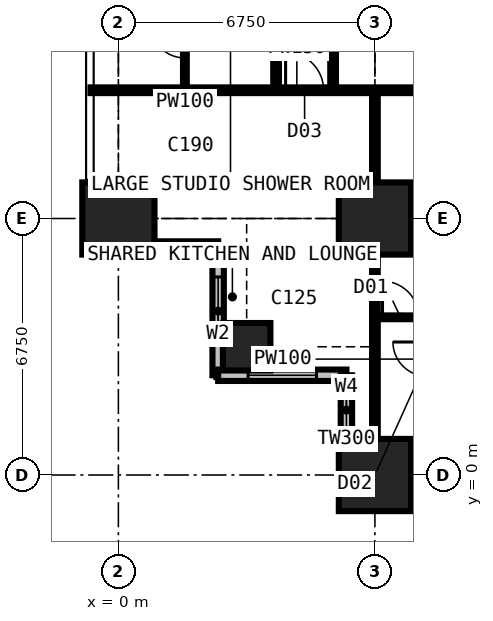
"""IFC4 building model, lengths in metres.
Left out: names, types, materials, properties, quantities, classifications, styles, units other than length and angle.
Written with IfcOpenShell. Run it as: python <this file> out.ifc"""

import sys

from ifc_helpers import new_model, si_unit, direction, frame, frame_2d, origin, origin_2d, place, context, subcontext, project, spatial, rectangle, extrude, element, fill, save


model = new_model("IFC4")
c1 = context("Model", 3, precision=1e-05, world=origin(), true_north=direction((0.0, 1.0)))
c2 = subcontext(c1, "Body", "Model", "MODEL_VIEW")
j1 = project(units=[si_unit("LENGTHUNIT", "METRE"), si_unit("PLANEANGLEUNIT", "RADIAN")], contexts=[c1])
p1 = place(None, origin())
s1 = spatial("IfcSite", under=j1, at=p1, CompositionType="ELEMENT")
p2 = place(p1, origin())
s2 = spatial("IfcBuilding", under=s1, at=p2, CompositionType="ELEMENT")
p3 = place(p2, frame((0.0, 0.0, 43.2)))
s3 = spatial("IfcBuildingStorey", under=s2, at=p3, CompositionType="ELEMENT", Elevation=43.2)
p4 = place(p3, frame((0.0, 6.75, 0.0), z_axis=(0.0, 0.0, 1.0), x_axis=(1.0, 0.0, 0.0)))
e1 = element("IfcColumn", 1, at=p4, inside=s3, PredefinedType="COLUMN", context=c2, shape_type="SweptSolid", body=[
    extrude(rectangle(XDim=1.9, YDim=1.9, at=origin_2d()), origin(), (0.0, 0.0, 1.0), 3.6),
])
p5 = place(p3, frame((3.375, 3.375, 0.0), z_axis=(0.0, 0.0, 1.0), x_axis=(1.0, 0.0, 0.0)))
e2 = element("IfcColumn", 2, at=p5, inside=s3, PredefinedType="COLUMN", context=c2, shape_type="SweptSolid", body=[
    extrude(rectangle(XDim=1.25, YDim=1.25, at=origin_2d()), origin(), (0.0, 0.0, 1.0), 3.6),
])
for number, where, z_axis, x_axis in (
    (3, (6.75, 0.0, 0.0), (0.0, 0.0, 1.0), (1.0, 0.0, 0.0)),
    (4, (6.75, 6.75, 0.0), (0.0, 0.0, 1.0), (1.0, 0.0, 0.0)),
):
    element("IfcColumn", number, at=place(p3, frame(where, z_axis=z_axis, x_axis=x_axis)), inside=s3, PredefinedType="COLUMN", context=c2, shape_type="SweptSolid", body=[
        extrude(rectangle(XDim=1.9, YDim=1.9, at=origin_2d()), origin(), (0.0, 0.0, 1.0), 3.6),
    ])
p6 = place(p3, frame((-0.75, 6.0, 0.0), z_axis=(0.0, 0.0, 1.0), x_axis=(1.0, 0.0, 0.0)))
e5 = element("IfcWall", 5, at=p6, inside=s3, PredefinedType="SOLIDWALL", context=c2, shape_type="SweptSolid", body=[
    extrude(rectangle(XDim=3.375, YDim=0.3, at=frame_2d((1.688, 0.0))), origin(), (0.0, 0.0, 1.0), 3.375),
])
p7 = place(p6, frame((1.857, 0.0, 0.9)))
e6 = element("IfcOpeningElement", 6, at=p7, cuts=e5, PredefinedType="OPENING", context=c2, shape_type="SweptSolid", body=[
    extrude(rectangle(XDim=1.2, YDim=1.8, at=frame_2d((0.6, 0.9))), frame((0.0, 0.16, 0.0), z_axis=(0.0, -1.0, 0.0), x_axis=(1.0, 0.0, 0.0)), (0.0, 0.0, 1.0), 0.32),
])
p8 = place(p3, frame((2.625, 6.0, 0.0), z_axis=(0.0, 0.0, 1.0), x_axis=(0.0, -1.0, 0.0)))
e7 = element("IfcWall", 7, at=p8, inside=s3, PredefinedType="SOLIDWALL", context=c2, shape_type="SweptSolid", body=[
    extrude(rectangle(XDim=3.375, YDim=0.3, at=frame_2d((1.688, 0.0))), origin(), (0.0, 0.0, 1.0), 3.375),
])
p9 = place(p8, frame((0.788, 0.0, 0.6)))
e8 = element("IfcOpeningElement", 8, at=p9, cuts=e7, PredefinedType="OPENING", context=c2, shape_type="SweptSolid", body=[
    extrude(rectangle(XDim=1.8, YDim=2.1, at=frame_2d((0.9, 1.05))), frame((0.0, 0.16, 0.0), z_axis=(0.0, -1.0, 0.0), x_axis=(1.0, 0.0, 0.0)), (0.0, 0.0, 1.0), 0.32),
])
p10 = place(p3, frame((2.625, 2.625, 0.0), z_axis=(0.0, 0.0, 1.0), x_axis=(1.0, 0.0, 0.0)))
e9 = element("IfcWall", 9, at=p10, inside=s3, PredefinedType="SOLIDWALL", context=c2, shape_type="SweptSolid", body=[
    extrude(rectangle(XDim=3.375, YDim=0.3, at=frame_2d((1.688, 0.0))), origin(), (0.0, 0.0, 1.0), 3.375),
])
p11 = place(p10, frame((0.788, 0.0, 0.6)))
e10 = element("IfcOpeningElement", 10, at=p11, cuts=e9, PredefinedType="OPENING", context=c2, shape_type="SweptSolid", body=[
    extrude(rectangle(XDim=1.8, YDim=2.1, at=frame_2d((0.9, 1.05))), frame((0.0, 0.16, 0.0), z_axis=(0.0, -1.0, 0.0), x_axis=(1.0, 0.0, 0.0)), (0.0, 0.0, 1.0), 0.32),
])
p12 = place(p3, frame((6.0, 2.625, 0.0), z_axis=(0.0, 0.0, 1.0), x_axis=(0.0, -1.0, 0.0)))
e11 = element("IfcWall", 11, at=p12, inside=s3, PredefinedType="SOLIDWALL", context=c2, shape_type="SweptSolid", body=[
    extrude(rectangle(XDim=3.375, YDim=0.3, at=frame_2d((1.688, 0.0))), origin(), (0.0, 0.0, 1.0), 3.375),
])
p13 = place(p12, frame((0.317, 0.0, 0.9)))
e12 = element("IfcOpeningElement", 12, at=p13, cuts=e11, PredefinedType="OPENING", context=c2, shape_type="SweptSolid", body=[
    extrude(rectangle(XDim=1.2, YDim=1.8, at=frame_2d((0.6, 0.9))), frame((0.0, 0.16, 0.0), z_axis=(0.0, -1.0, 0.0), x_axis=(1.0, 0.0, 0.0)), (0.0, 0.0, 1.0), 0.32),
])
p14 = place(p3, frame((-0.734, 10.125, 0.0), z_axis=(0.0, 0.0, 1.0), x_axis=(1.0, 0.0, 0.0)))
e13 = element("IfcWall", 13, at=p14, inside=s3, PredefinedType="PARTITIONING", context=c2, shape_type="SweptSolid", body=[
    extrude(rectangle(XDim=10.859, YDim=0.15, at=frame_2d((5.429, 0.0))), origin(), (0.0, 0.0, 1.0), 3.375),
])
p15 = place(p14, frame((5.134, 0.0, 0.0)))
e14 = element("IfcOpeningElement", 14, at=p15, cuts=e13, PredefinedType="OPENING", context=c2, shape_type="SweptSolid", body=[
    extrude(rectangle(XDim=1.0, YDim=2.2, at=frame_2d((0.5, 1.1))), frame((0.0, 0.085, 0.0), z_axis=(0.0, -1.0, 0.0), x_axis=(1.0, 0.0, 0.0)), (0.0, 0.0, 1.0), 0.17),
])
p16 = place(p3, frame((1.75, 10.125, 0.0), z_axis=(0.0, 0.0, 1.0), x_axis=(0.0, 1.0, 0.0)))
e15 = element("IfcWall", 15, at=p16, inside=s3, PredefinedType="PARTITIONING", context=c2, shape_type="SweptSolid", body=[
    extrude(rectangle(XDim=2.6, YDim=0.1, at=frame_2d((1.3, 0.0))), origin(), (0.0, 0.0, 1.0), 3.375),
])
p17 = place(p16, frame((0.85, 0.0, 0.0)))
e16 = element("IfcOpeningElement", 16, at=p17, cuts=e15, PredefinedType="OPENING", context=c2, shape_type="SweptSolid", body=[
    extrude(rectangle(XDim=0.9, YDim=2.2, at=frame_2d((0.45, 1.1))), frame((0.0, 0.06, 0.0), z_axis=(0.0, -1.0, 0.0), x_axis=(1.0, 0.0, 0.0)), (0.0, 0.0, 1.0), 0.12),
])
p18 = place(p3, frame((4.15, 10.125, 0.0), z_axis=(0.0, 0.0, 1.0), x_axis=(0.0, 1.0, 0.0)))
e17 = element("IfcWall", 17, at=p18, inside=s3, PredefinedType="PARTITIONING", context=c2, shape_type="SweptSolid", body=[
    extrude(rectangle(XDim=23.625, YDim=0.15, at=frame_2d((11.812, 0.0))), origin(), (0.0, 0.0, 1.0), 3.375),
])
p19 = place(p18, frame((20.5, 0.0, 0.0)))
e18 = element("IfcOpeningElement", 18, at=p19, cuts=e17, PredefinedType="OPENING", context=c2, shape_type="SweptSolid", body=[
    extrude(rectangle(XDim=0.95, YDim=2.2, at=frame_2d((0.475, 1.1))), frame((0.0, 0.085, 0.0), z_axis=(0.0, -1.0, 0.0), x_axis=(1.0, 0.0, 0.0)), (0.0, 0.0, 1.0), 0.17),
])
p20 = place(p18, frame((17.125, 0.0, 0.0)))
e19 = element("IfcOpeningElement", 19, at=p20, cuts=e17, PredefinedType="OPENING", context=c2, shape_type="SweptSolid", body=[
    extrude(rectangle(XDim=0.95, YDim=2.2, at=frame_2d((0.475, 1.1))), frame((0.0, 0.085, 0.0), z_axis=(0.0, -1.0, 0.0), x_axis=(1.0, 0.0, 0.0)), (0.0, 0.0, 1.0), 0.17),
])
p21 = place(p18, frame((13.7, 0.0, 0.0)))
e20 = element("IfcOpeningElement", 20, at=p21, cuts=e17, PredefinedType="OPENING", context=c2, shape_type="SweptSolid", body=[
    extrude(rectangle(XDim=0.95, YDim=2.2, at=frame_2d((0.475, 1.1))), frame((0.0, 0.085, 0.0), z_axis=(0.0, -1.0, 0.0), x_axis=(1.0, 0.0, 0.0)), (0.0, 0.0, 1.0), 0.17),
])
p22 = place(p18, frame((4.2, 0.0, 0.0)))
e21 = element("IfcOpeningElement", 21, at=p22, cuts=e17, PredefinedType="OPENING", context=c2, shape_type="SweptSolid", body=[
    extrude(rectangle(XDim=0.95, YDim=2.2, at=frame_2d((0.475, 1.1))), frame((0.0, 0.085, 0.0), z_axis=(0.0, -1.0, 0.0), x_axis=(1.0, 0.0, 0.0)), (0.0, 0.0, 1.0), 0.17),
])
p23 = place(p18, frame((10.95, 0.0, 0.0)))
e22 = element("IfcOpeningElement", 22, at=p23, cuts=e17, PredefinedType="OPENING", context=c2, shape_type="SweptSolid", body=[
    extrude(rectangle(XDim=0.95, YDim=2.2, at=frame_2d((0.475, 1.1))), frame((0.0, 0.085, 0.0), z_axis=(0.0, -1.0, 0.0), x_axis=(1.0, 0.0, 0.0)), (0.0, 0.0, 1.0), 0.17),
])
p24 = place(p3, frame((5.65, 10.125, 0.0), z_axis=(0.0, 0.0, 1.0), x_axis=(0.0, 1.0, 0.0)))
e23 = element("IfcWall", 23, at=p24, inside=s3, PredefinedType="PARTITIONING", context=c2, shape_type="SweptSolid", body=[
    extrude(rectangle(XDim=10.762, YDim=0.15, at=frame_2d((5.381, 0.0))), origin(), (0.0, 0.0, 1.0), 3.375),
])
p25 = place(p24, frame((4.9, 0.0, 0.0)))
e24 = element("IfcOpeningElement", 24, at=p25, cuts=e23, PredefinedType="OPENING", context=c2, shape_type="SweptSolid", body=[
    extrude(rectangle(XDim=0.95, YDim=2.2, at=frame_2d((0.475, 1.1))), frame((0.0, 0.085, 0.0), z_axis=(0.0, -1.0, 0.0), x_axis=(1.0, 0.0, 0.0)), (0.0, 0.0, 1.0), 0.17),
])
p26 = place(p3, frame((6.75, -0.734, 0.0), z_axis=(0.0, 0.0, 1.0), x_axis=(0.0, 1.0, 0.0)))
e25 = element("IfcWall", 25, at=p26, inside=s3, PredefinedType="PARTITIONING", context=c2, shape_type="SweptSolid", body=[
    extrude(rectangle(XDim=10.859, YDim=0.15, at=frame_2d((5.429, 0.0))), origin(), (0.0, 0.0, 1.0), 2.877),
])
p27 = place(p3, frame((6.75, 4.15, 0.0), z_axis=(0.0, 0.0, 1.0), x_axis=(1.0, 0.0, 0.0)))
e26 = element("IfcWall", 26, at=p27, inside=s3, PredefinedType="PARTITIONING", context=c2, shape_type="SweptSolid", body=[
    extrude(rectangle(XDim=23.625, YDim=0.1, at=frame_2d((11.812, 0.0))), origin(), (0.0, 0.0, 1.0), 3.375),
])
p28 = place(p27, frame((0.2, 0.0, 0.0)))
e27 = element("IfcOpeningElement", 27, at=p28, cuts=e26, PredefinedType="OPENING", context=c2, shape_type="SweptSolid", body=[
    extrude(rectangle(XDim=0.95, YDim=2.2, at=frame_2d((0.475, 1.1))), frame((0.0, 0.06, 0.0), z_axis=(0.0, -1.0, 0.0), x_axis=(1.0, 0.0, 0.0)), (0.0, 0.0, 1.0), 0.12),
])
p29 = place(p27, frame((3.625, 0.0, 0.0)))
e28 = element("IfcOpeningElement", 28, at=p29, cuts=e26, PredefinedType="OPENING", context=c2, shape_type="SweptSolid", body=[
    extrude(rectangle(XDim=0.95, YDim=2.2, at=frame_2d((0.475, 1.1))), frame((0.0, 0.06, 0.0), z_axis=(0.0, -1.0, 0.0), x_axis=(1.0, 0.0, 0.0)), (0.0, 0.0, 1.0), 0.12),
])
p30 = place(p27, frame((7.0, 0.0, 0.0)))
e29 = element("IfcOpeningElement", 29, at=p30, cuts=e26, PredefinedType="OPENING", context=c2, shape_type="SweptSolid", body=[
    extrude(rectangle(XDim=0.95, YDim=2.2, at=frame_2d((0.475, 1.1))), frame((0.0, 0.06, 0.0), z_axis=(0.0, -1.0, 0.0), x_axis=(1.0, 0.0, 0.0)), (0.0, 0.0, 1.0), 0.12),
])
p31 = place(p27, frame((10.375, 0.0, 0.0)))
e30 = element("IfcOpeningElement", 30, at=p31, cuts=e26, PredefinedType="OPENING", context=c2, shape_type="SweptSolid", body=[
    extrude(rectangle(XDim=0.95, YDim=2.2, at=frame_2d((0.475, 1.1))), frame((0.0, 0.06, 0.0), z_axis=(0.0, -1.0, 0.0), x_axis=(1.0, 0.0, 0.0)), (0.0, 0.0, 1.0), 0.12),
])
p32 = place(p27, frame((18.475, 0.0, 0.0)))
e31 = element("IfcOpeningElement", 31, at=p32, cuts=e26, PredefinedType="OPENING", context=c2, shape_type="SweptSolid", body=[
    extrude(rectangle(XDim=0.95, YDim=2.2, at=frame_2d((0.475, 1.1))), frame((0.0, 0.06, 0.0), z_axis=(0.0, -1.0, 0.0), x_axis=(1.0, 0.0, 0.0)), (0.0, 0.0, 1.0), 0.12),
])
p33 = place(p27, frame((13.7, 0.0, 0.0)))
e32 = element("IfcOpeningElement", 32, at=p33, cuts=e26, PredefinedType="OPENING", context=c2, shape_type="SweptSolid", body=[
    extrude(rectangle(XDim=0.95, YDim=2.2, at=frame_2d((0.475, 1.1))), frame((0.0, 0.06, 0.0), z_axis=(0.0, -1.0, 0.0), x_axis=(1.0, 0.0, 0.0)), (0.0, 0.0, 1.0), 0.12),
])
p34 = place(p7, origin())
e33 = element("IfcWindow", 33, at=p34, inside=s3, PartitioningType="SINGLE_PANEL", PredefinedType="WINDOW", context=c2, shape_type="SweptSolid", body=[
    extrude(rectangle(XDim=1.2, YDim=1.8, at=frame_2d((0.6, 0.9))), frame((0.0, 0.03, 0.0), z_axis=(0.0, -1.0, 0.0), x_axis=(1.0, 0.0, 0.0)), (0.0, 0.0, 1.0), 0.06),
])
fill(e6, e33)
p35 = place(p9, origin())
e34 = element("IfcWindow", 34, at=p35, inside=s3, PartitioningType="SINGLE_PANEL", PredefinedType="WINDOW", context=c2, shape_type="SweptSolid", body=[
    extrude(rectangle(XDim=1.8, YDim=2.1, at=frame_2d((0.9, 1.05))), frame((0.0, 0.03, 0.0), z_axis=(0.0, -1.0, 0.0), x_axis=(1.0, 0.0, 0.0)), (0.0, 0.0, 1.0), 0.06),
])
fill(e8, e34)
p36 = place(p11, origin())
e35 = element("IfcWindow", 35, at=p36, inside=s3, PartitioningType="SINGLE_PANEL", PredefinedType="WINDOW", context=c2, shape_type="SweptSolid", body=[
    extrude(rectangle(XDim=1.8, YDim=2.1, at=frame_2d((0.9, 1.05))), frame((0.0, 0.03, 0.0), z_axis=(0.0, -1.0, 0.0), x_axis=(1.0, 0.0, 0.0)), (0.0, 0.0, 1.0), 0.06),
])
fill(e10, e35)
p37 = place(p13, origin())
e36 = element("IfcWindow", 36, at=p37, inside=s3, PartitioningType="SINGLE_PANEL", PredefinedType="WINDOW", context=c2, shape_type="SweptSolid", body=[
    extrude(rectangle(XDim=1.2, YDim=1.8, at=frame_2d((0.6, 0.9))), frame((0.0, 0.03, 0.0), z_axis=(0.0, -1.0, 0.0), x_axis=(1.0, 0.0, 0.0)), (0.0, 0.0, 1.0), 0.06),
])
fill(e12, e36)
p38 = place(p15, origin())
e37 = element("IfcDoor", 37, at=p38, inside=s3, OperationType="SINGLE_SWING_LEFT", PredefinedType="DOOR", context=c2, shape_type="SweptSolid", body=[
    extrude(rectangle(XDim=1.0, YDim=2.2, at=frame_2d((0.5, 1.1))), frame((0.0, 0.025, 0.0), z_axis=(0.0, -1.0, 0.0), x_axis=(1.0, 0.0, 0.0)), (0.0, 0.0, 1.0), 0.05),
])
fill(e14, e37)
p39 = place(p28, origin())
e38 = element("IfcDoor", 38, at=p39, inside=s3, OperationType="SINGLE_SWING_LEFT", PredefinedType="DOOR", context=c2, shape_type="SweptSolid", body=[
    extrude(rectangle(XDim=0.95, YDim=2.2, at=frame_2d((0.475, 1.1))), frame((0.0, 0.025, 0.0), z_axis=(0.0, -1.0, 0.0), x_axis=(1.0, 0.0, 0.0)), (0.0, 0.0, 1.0), 0.05),
])
fill(e27, e38)
p40 = place(p17, origin())
e39 = element("IfcDoor", 39, at=p40, inside=s3, OperationType="SINGLE_SWING_RIGHT", PredefinedType="DOOR", context=c2, shape_type="SweptSolid", body=[
    extrude(rectangle(XDim=0.9, YDim=2.2, at=frame_2d((0.45, 1.1))), frame((0.0, 0.025, 0.0), z_axis=(0.0, -1.0, 0.0), x_axis=(1.0, 0.0, 0.0)), (0.0, 0.0, 1.0), 0.05),
])
fill(e16, e39)
save(model, sys.argv[1])
